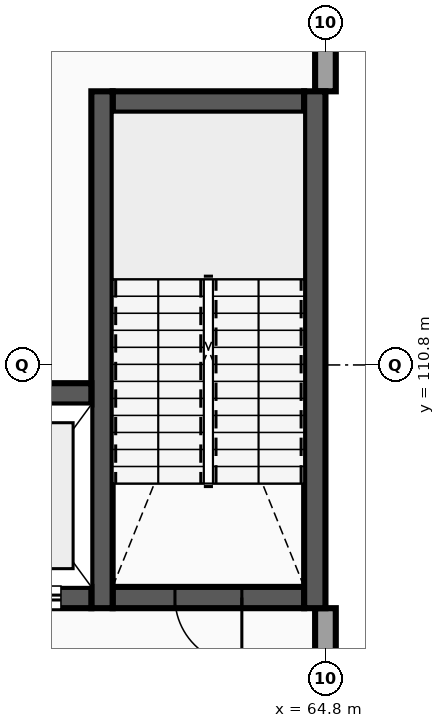
"""IFC4 building model, lengths in metres.
Left out: names, types, materials, properties, quantities, classifications, styles, units other than length and angle.
Written with IfcOpenShell. Run it as: python <this file> out.ifc"""

import sys

from ifc_helpers import new_model, si_unit, direction, frame, frame_2d, origin, place, context, subcontext, project, spatial, rectangle, extrude, element, fill, save


model = new_model("IFC4")
c1 = context("Model", 3, precision=1e-05, world=origin(), true_north=direction((0.0, 1.0)))
c2 = subcontext(c1, "Body", "Model", "MODEL_VIEW")
j1 = project(units=[si_unit("LENGTHUNIT", "METRE"), si_unit("PLANEANGLEUNIT", "RADIAN")], contexts=[c1])
p1 = place(None, origin())
s1 = spatial("IfcSite", under=j1, at=p1, CompositionType="ELEMENT")
p2 = place(p1, origin())
s2 = spatial("IfcBuilding", under=s1, at=p2, CompositionType="ELEMENT")
p3 = place(p2, frame((0.0, 0.0, 14.0)))
s3 = spatial("IfcBuildingStorey", under=s2, at=p3, CompositionType="ELEMENT", Elevation=14.0)
p4 = place(p3, frame((64.8, 103.6, 0.0), z_axis=(0.0, 0.0, 1.0), x_axis=(0.0, 1.0, 0.0)))
e1 = element("IfcWall", 1, at=p4, inside=s3, PredefinedType="STANDARD", context=c2, shape_type="SweptSolid", body=[
    extrude(rectangle(XDim=3.2, YDim=0.34, at=frame_2d((1.6, 0.0))), origin(), (0.0, 0.0, 1.0), 4.2),
])
p5 = place(p4, frame((1.119, 0.0, 0.95)))
e2 = element("IfcOpeningElement", 2, at=p5, cuts=e1, PredefinedType="OPENING", context=c2, shape_type="SweptSolid", body=[
    extrude(rectangle(XDim=0.962, YDim=1.26, at=frame_2d((0.481, 0.63))), frame((0.0, 0.18, 0.0), z_axis=(0.0, -1.0, 0.0), x_axis=(1.0, 0.0, 0.0)), (0.0, 0.0, 1.0), 0.36),
])
p6 = place(p3, frame((64.8, 115.3, 0.0), z_axis=(0.0, 0.0, 1.0), x_axis=(0.0, 1.0, 0.0)))
e3 = element("IfcWall", 3, at=p6, inside=s3, PredefinedType="STANDARD", context=c2, shape_type="SweptSolid", body=[
    extrude(rectangle(XDim=2.53, YDim=0.34, at=frame_2d((1.265, 0.0))), origin(), (0.0, 0.0, 1.0), 4.2),
])
p7 = place(p3, frame((61.3, 106.975, 0.0), z_axis=(0.0, 0.0, 1.0), x_axis=(1.0, 0.0, 0.0)))
e4 = element("IfcWall", 4, at=p7, inside=s3, PredefinedType="SHEAR", context=c2, shape_type="SweptSolid", body=[
    extrude(rectangle(XDim=3.15, YDim=0.35, at=frame_2d((1.575, 0.0))), origin(), (0.0, 0.0, 1.0), 4.2),
])
p8 = place(p7, frame((1.025, 0.0, 0.0)))
e5 = element("IfcOpeningElement", 5, at=p8, cuts=e4, PredefinedType="OPENING", context=c2, shape_type="SweptSolid", body=[
    extrude(rectangle(XDim=1.1, YDim=2.15, at=frame_2d((0.55, 1.075))), frame((0.0, 0.185, 0.0), z_axis=(0.0, -1.0, 0.0), x_axis=(1.0, 0.0, 0.0)), (0.0, 0.0, 1.0), 0.37),
])
p9 = place(p3, frame((61.3, 115.125, 0.0), z_axis=(0.0, 0.0, 1.0), x_axis=(1.0, 0.0, 0.0)))
e6 = element("IfcWall", 6, at=p9, inside=s3, PredefinedType="SHEAR", context=c2, shape_type="SweptSolid", body=[
    extrude(rectangle(XDim=3.15, YDim=0.35, at=frame_2d((1.575, 0.0))), origin(), (0.0, 0.0, 1.0), 4.2),
])
for number, where, z_axis, x_axis in (
    (7, (61.125, 106.8, 0.0), (0.0, 0.0, 1.0), (0.0, 1.0, 0.0)),
    (8, (64.625, 106.8, 0.0), (0.0, 0.0, 1.0), (0.0, 1.0, 0.0)),
):
    element("IfcWall", number, at=place(p3, frame(where, z_axis=z_axis, x_axis=x_axis)), inside=s3, PredefinedType="SHEAR", context=c2, shape_type="SweptSolid", body=[
        extrude(rectangle(XDim=8.5, YDim=0.35, at=frame_2d((4.25, 0.0))), origin(), (0.0, 0.0, 1.0), 4.2),
    ])
p10 = place(p3, frame((58.75, 106.975, 0.0), z_axis=(0.0, 0.0, 1.0), x_axis=(1.0, 0.0, 0.0)))
e9 = element("IfcWall", 9, at=p10, inside=s3, PredefinedType="SHEAR", context=c2, shape_type="SweptSolid", body=[
    extrude(rectangle(XDim=2.2, YDim=0.35, at=frame_2d((1.1, 0.0))), origin(), (0.0, 0.0, 1.0), 4.2),
])
p11 = place(p10, frame((0.5, 0.0, 0.0)))
e10 = element("IfcOpeningElement", 10, at=p11, cuts=e9, PredefinedType="OPENING", context=c2, shape_type="SweptSolid", body=[
    extrude(rectangle(XDim=1.2, YDim=2.2, at=frame_2d((0.6, 1.1))), frame((0.0, 0.185, 0.0), z_axis=(0.0, -1.0, 0.0), x_axis=(1.0, 0.0, 0.0)), (0.0, 0.0, 1.0), 0.37),
])
p12 = place(p3, frame((58.75, 110.325, 0.0), z_axis=(0.0, 0.0, 1.0), x_axis=(1.0, 0.0, 0.0)))
e11 = element("IfcWall", 11, at=p12, inside=s3, PredefinedType="SHEAR", context=c2, shape_type="SweptSolid", body=[
    extrude(rectangle(XDim=2.2, YDim=0.35, at=frame_2d((1.1, 0.0))), origin(), (0.0, 0.0, 1.0), 4.2),
])
p13 = place(p8, origin())
e12 = element("IfcDoor", 12, at=p13, inside=s3, OperationType="SINGLE_SWING_RIGHT", PredefinedType="DOOR", context=c2, shape_type="SweptSolid", body=[
    extrude(rectangle(XDim=1.1, YDim=2.15, at=frame_2d((0.55, 1.075))), frame((0.0, 0.025, 0.0), z_axis=(0.0, -1.0, 0.0), x_axis=(1.0, 0.0, 0.0)), (0.0, 0.0, 1.0), 0.05),
])
fill(e5, e12)
p14 = place(p11, origin())
e13 = element("IfcDoor", 13, at=p14, inside=s3, OperationType="SLIDING_TO_RIGHT", PredefinedType="DOOR", context=c2, shape_type="SweptSolid", body=[
    extrude(rectangle(XDim=1.2, YDim=2.2, at=frame_2d((0.6, 1.1))), frame((0.0, 0.025, 0.0), z_axis=(0.0, -1.0, 0.0), x_axis=(1.0, 0.0, 0.0)), (0.0, 0.0, 1.0), 0.05),
])
fill(e10, e13)
save(model, sys.argv[1])
